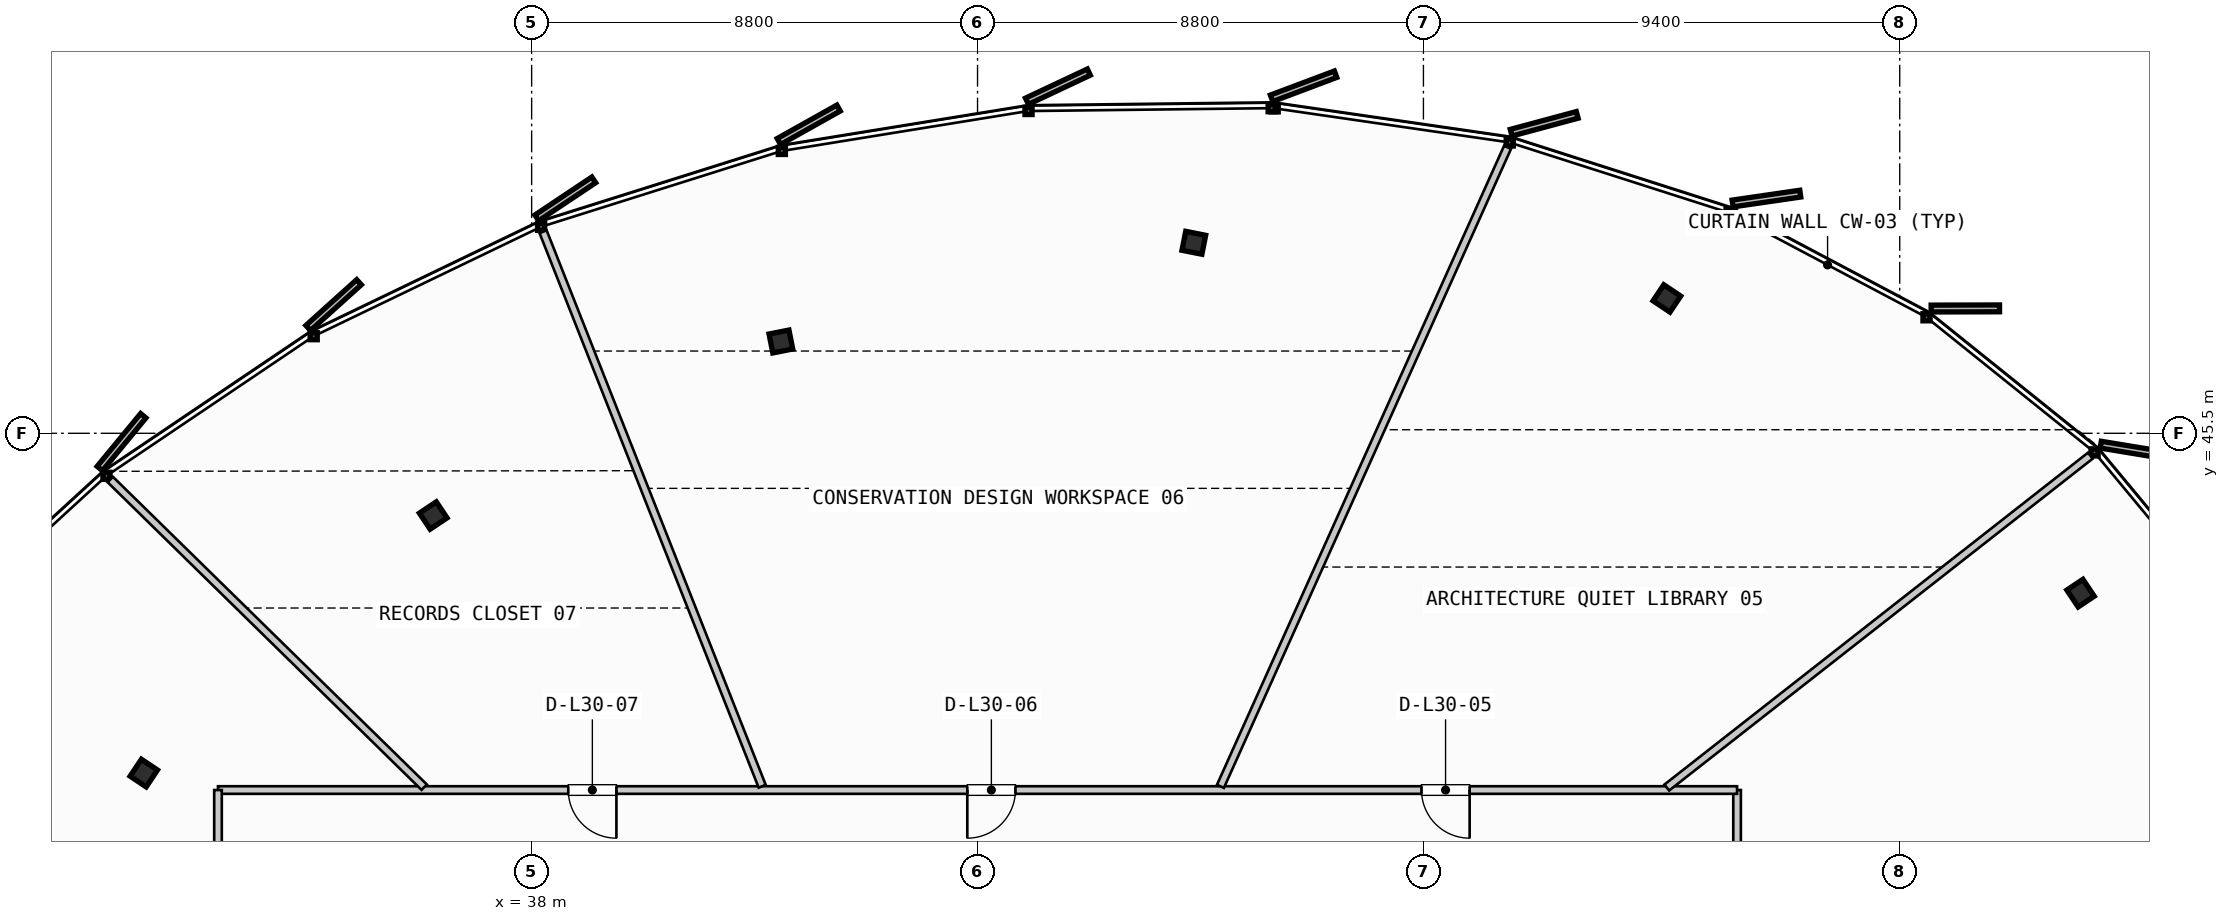
"""IFC4 building model, lengths in metres.
Left out: names, types, materials, properties, quantities, classifications, styles, units other than length and angle.
Written with IfcOpenShell. Run it as: python <this file> out.ifc"""

import sys

from ifc_helpers import new_model, si_unit, direction, frame, frame_2d, origin, origin_2d, place, context, subcontext, project, spatial, rectangle, i_section, extrude, source, transform, mapped, element, fill, save


model = new_model("IFC4")
c1 = context("Model", 3, precision=1e-05, world=origin(), true_north=direction((0.0, 1.0)))
c2 = subcontext(c1, "Body", "Model", "MODEL_VIEW")
j1 = project(units=[si_unit("LENGTHUNIT", "METRE"), si_unit("PLANEANGLEUNIT", "RADIAN")], contexts=[c1])
p1 = place(None, origin())
s1 = spatial("IfcSite", under=j1, at=p1, CompositionType="ELEMENT")
p2 = place(p1, origin())
s2 = spatial("IfcBuilding", under=s1, at=p2, CompositionType="ELEMENT")
p3 = place(p2, frame((0.0, 0.0, 121.6)))
s3 = spatial("IfcBuildingStorey", under=s2, at=p3, CompositionType="ELEMENT", Elevation=121.6)
m1 = source(origin(), c2, "Body", "SweptSolid", [
    extrude(i_section(OverallWidth=0.401, OverallDepth=0.381, WebThickness=0.032, FlangeThickness=0.051, FilletRadius=0.015, at=origin_2d()), origin(), (0.0, 0.0, 1.0), 3.35),
])
for number, where, z_axis, x_axis in (
    (1, (68.569, 42.345, 0.0), (0.0, 0.0, 1.0), (0.831, 0.556, 0.0)),
    (2, (60.405, 48.161, 0.0), (0.0, 0.0, 1.0), (0.556, 0.831, 0.0)),
    (3, (51.069, 49.259, 0.0), (0.0, 0.0, 1.0), (0.195, 0.981, 0.0)),
    (4, (42.919, 47.311, 0.0), (0.0, 0.0, 1.0), (-0.195, 0.981, 0.0)),
    (5, (36.058, 43.877, 0.0), (0.0, 0.0, 1.0), (-0.556, 0.831, 0.0)),
    (6, (30.346, 38.794, 0.0), (0.0, 0.0, 1.0), (-0.831, 0.556, 0.0)),
):
    element("IfcColumn", number, at=place(p3, frame(where, z_axis=z_axis, x_axis=x_axis)), inside=s3, PredefinedType="COLUMN", context=c2, shape_type="MappedRepresentation", body=[
        mapped(m1, transform((0.0, 0.0, 0.0), scale=1.0)),
    ])
p4 = place(p3, frame((61.79, 17.14, 0.0), z_axis=(0.0, 0.0, 1.0), x_axis=(0.0, 1.0, 0.0)))
e7 = element("IfcWall", 7, at=p4, inside=s3, PredefinedType="PARTITIONING", context=c2, shape_type="SweptSolid", body=[
    extrude(rectangle(XDim=21.32, YDim=0.15, at=frame_2d((10.66, 0.0))), origin(), (0.0, 0.0, 1.0), 2.775),
])
p5 = place(p4, frame((5.8, 0.0, 0.0)))
e8 = element("IfcOpeningElement", 8, at=p5, cuts=e7, PredefinedType="OPENING", context=c2, shape_type="SweptSolid", body=[
    extrude(rectangle(XDim=0.95, YDim=2.15, at=frame_2d((0.475, 1.075))), frame((0.0, 0.085, 0.0), z_axis=(0.0, -1.0, 0.0), x_axis=(1.0, 0.0, 0.0)), (0.0, 0.0, 1.0), 0.17),
])
p6 = place(p4, frame((15.879, 0.0, 0.0)))
e9 = element("IfcOpeningElement", 9, at=p6, cuts=e7, PredefinedType="OPENING", context=c2, shape_type="SweptSolid", body=[
    extrude(rectangle(XDim=0.95, YDim=2.15, at=frame_2d((0.475, 1.075))), frame((0.0, 0.085, 0.0), z_axis=(0.0, -1.0, 0.0), x_axis=(1.0, 0.0, 0.0)), (0.0, 0.0, 1.0), 0.17),
])
p7 = place(p3, frame((61.79, 38.46, 0.0), z_axis=(0.0, 0.0, 1.0), x_axis=(-1.0, 0.0, 0.0)))
e10 = element("IfcWall", 10, at=p7, inside=s3, PredefinedType="PARTITIONING", context=c2, shape_type="SweptSolid", body=[
    extrude(rectangle(XDim=29.98, YDim=0.15, at=frame_2d((14.99, 0.0))), origin(), (0.0, 0.0, 1.0), 2.775),
])
p8 = place(p7, frame((5.278, 0.0, 0.0)))
e11 = element("IfcOpeningElement", 11, at=p8, cuts=e10, PredefinedType="OPENING", context=c2, shape_type="SweptSolid", body=[
    extrude(rectangle(XDim=0.95, YDim=2.15, at=frame_2d((0.475, 1.075))), frame((0.0, 0.085, 0.0), z_axis=(0.0, -1.0, 0.0), x_axis=(1.0, 0.0, 0.0)), (0.0, 0.0, 1.0), 0.17),
])
p9 = place(p7, frame((14.242, 0.0, 0.0)))
e12 = element("IfcOpeningElement", 12, at=p9, cuts=e10, PredefinedType="OPENING", context=c2, shape_type="SweptSolid", body=[
    extrude(rectangle(XDim=0.95, YDim=2.15, at=frame_2d((0.475, 1.075))), frame((0.0, 0.085, 0.0), z_axis=(0.0, -1.0, 0.0), x_axis=(1.0, 0.0, 0.0)), (0.0, 0.0, 1.0), 0.17),
])
p10 = place(p7, frame((22.117, 0.0, 0.0)))
e13 = element("IfcOpeningElement", 13, at=p10, cuts=e10, PredefinedType="OPENING", context=c2, shape_type="SweptSolid", body=[
    extrude(rectangle(XDim=0.95, YDim=2.15, at=frame_2d((0.475, 1.075))), frame((0.0, 0.085, 0.0), z_axis=(0.0, -1.0, 0.0), x_axis=(1.0, 0.0, 0.0)), (0.0, 0.0, 1.0), 0.17),
])
p11 = place(p3, frame((31.81, 38.46, 0.0), z_axis=(0.0, 0.0, 1.0), x_axis=(0.0, -1.0, 0.0)))
e14 = element("IfcWall", 14, at=p11, inside=s3, PredefinedType="PARTITIONING", context=c2, shape_type="SweptSolid", body=[
    extrude(rectangle(XDim=21.32, YDim=0.15, at=frame_2d((10.66, 0.0))), origin(), (0.0, 0.0, 1.0), 2.775),
])
p12 = place(p11, frame((4.656, 0.0, 0.0)))
e15 = element("IfcOpeningElement", 15, at=p12, cuts=e14, PredefinedType="OPENING", context=c2, shape_type="SweptSolid", body=[
    extrude(rectangle(XDim=0.95, YDim=2.15, at=frame_2d((0.475, 1.075))), frame((0.0, 0.085, 0.0), z_axis=(0.0, -1.0, 0.0), x_axis=(1.0, 0.0, 0.0)), (0.0, 0.0, 1.0), 0.17),
])
p13 = place(p11, frame((13.989, 0.0, 0.0)))
e16 = element("IfcOpeningElement", 16, at=p13, cuts=e14, PredefinedType="OPENING", context=c2, shape_type="SweptSolid", body=[
    extrude(rectangle(XDim=0.95, YDim=2.15, at=frame_2d((0.475, 1.075))), frame((0.0, 0.085, 0.0), z_axis=(0.0, -1.0, 0.0), x_axis=(1.0, 0.0, 0.0)), (0.0, 0.0, 1.0), 0.17),
])
p14 = place(p3, frame((60.403, 38.509, 0.0), z_axis=(0.0, 0.0, 1.0), x_axis=(0.787184712213, 0.616717300599, 0.0)))
e17 = element("IfcWall", 17, at=p14, inside=s3, PredefinedType="PARTITIONING", context=c2, shape_type="SweptSolid", body=[
    extrude(rectangle(XDim=10.62, YDim=0.15, at=frame_2d((5.31, 0.0))), origin(), (0.0, 0.0, 1.0), 2.775),
])
p15 = place(p3, frame((51.594, 38.533, 0.0), z_axis=(0.0, 0.0, 1.0), x_axis=(0.409859427718, 0.912148699232, 0.0)))
e18 = element("IfcWall", 18, at=p15, inside=s3, PredefinedType="PARTITIONING", context=c2, shape_type="SweptSolid", body=[
    extrude(rectangle(XDim=13.825, YDim=0.15, at=frame_2d((6.913, 0.0))), origin(), (0.0, 0.0, 1.0), 2.775),
])
p16 = place(p3, frame((42.55, 38.534, 0.0), z_axis=(0.0, 0.0, 1.0), x_axis=(-0.367488212125, 0.930028179116, 0.0)))
e19 = element("IfcWall", 19, at=p16, inside=s3, PredefinedType="PARTITIONING", context=c2, shape_type="SweptSolid", body=[
    extrude(rectangle(XDim=11.767, YDim=0.15, at=frame_2d((5.883, 0.0))), origin(), (0.0, 0.0, 1.0), 2.775),
])
p17 = place(p3, frame((35.88, 38.516, 0.0), z_axis=(0.0, 0.0, 1.0), x_axis=(-0.714233380427, 0.69990762125, 0.0)))
e20 = element("IfcWall", 20, at=p17, inside=s3, PredefinedType="PARTITIONING", context=c2, shape_type="SweptSolid", body=[
    extrude(rectangle(XDim=8.674, YDim=0.15, at=frame_2d((4.337, 0.0))), origin(), (0.0, 0.0, 1.0), 2.775),
])
m2 = source(origin(), c2, "Body", "SweptSolid", [
    extrude(rectangle(XDim=0.95, YDim=2.15, at=frame_2d((0.475, 1.075))), frame((0.0, 0.025, 0.0), z_axis=(0.0, -1.0, 0.0), x_axis=(1.0, 0.0, 0.0)), (0.0, 0.0, 1.0), 0.05),
])
p18 = place(p8, origin())
e21 = element("IfcDoor", 21, at=p18, inside=s3, OperationType="SINGLE_SWING_LEFT", PredefinedType="DOOR", context=c2, shape_type="MappedRepresentation", body=[
    mapped(m2, transform((0.0, 0.0, 0.0), scale=1.0)),
])
fill(e11, e21)
p19 = place(p9, origin())
e22 = element("IfcDoor", 22, at=p19, inside=s3, OperationType="SINGLE_SWING_RIGHT", PredefinedType="DOOR", context=c2, shape_type="MappedRepresentation", body=[
    mapped(m2, transform((0.0, 0.0, 0.0), scale=1.0)),
])
fill(e12, e22)
p20 = place(p10, origin())
e23 = element("IfcDoor", 23, at=p20, inside=s3, OperationType="SINGLE_SWING_LEFT", PredefinedType="DOOR", context=c2, shape_type="MappedRepresentation", body=[
    mapped(m2, transform((0.0, 0.0, 0.0), scale=1.0)),
])
fill(e13, e23)
save(model, sys.argv[1])
